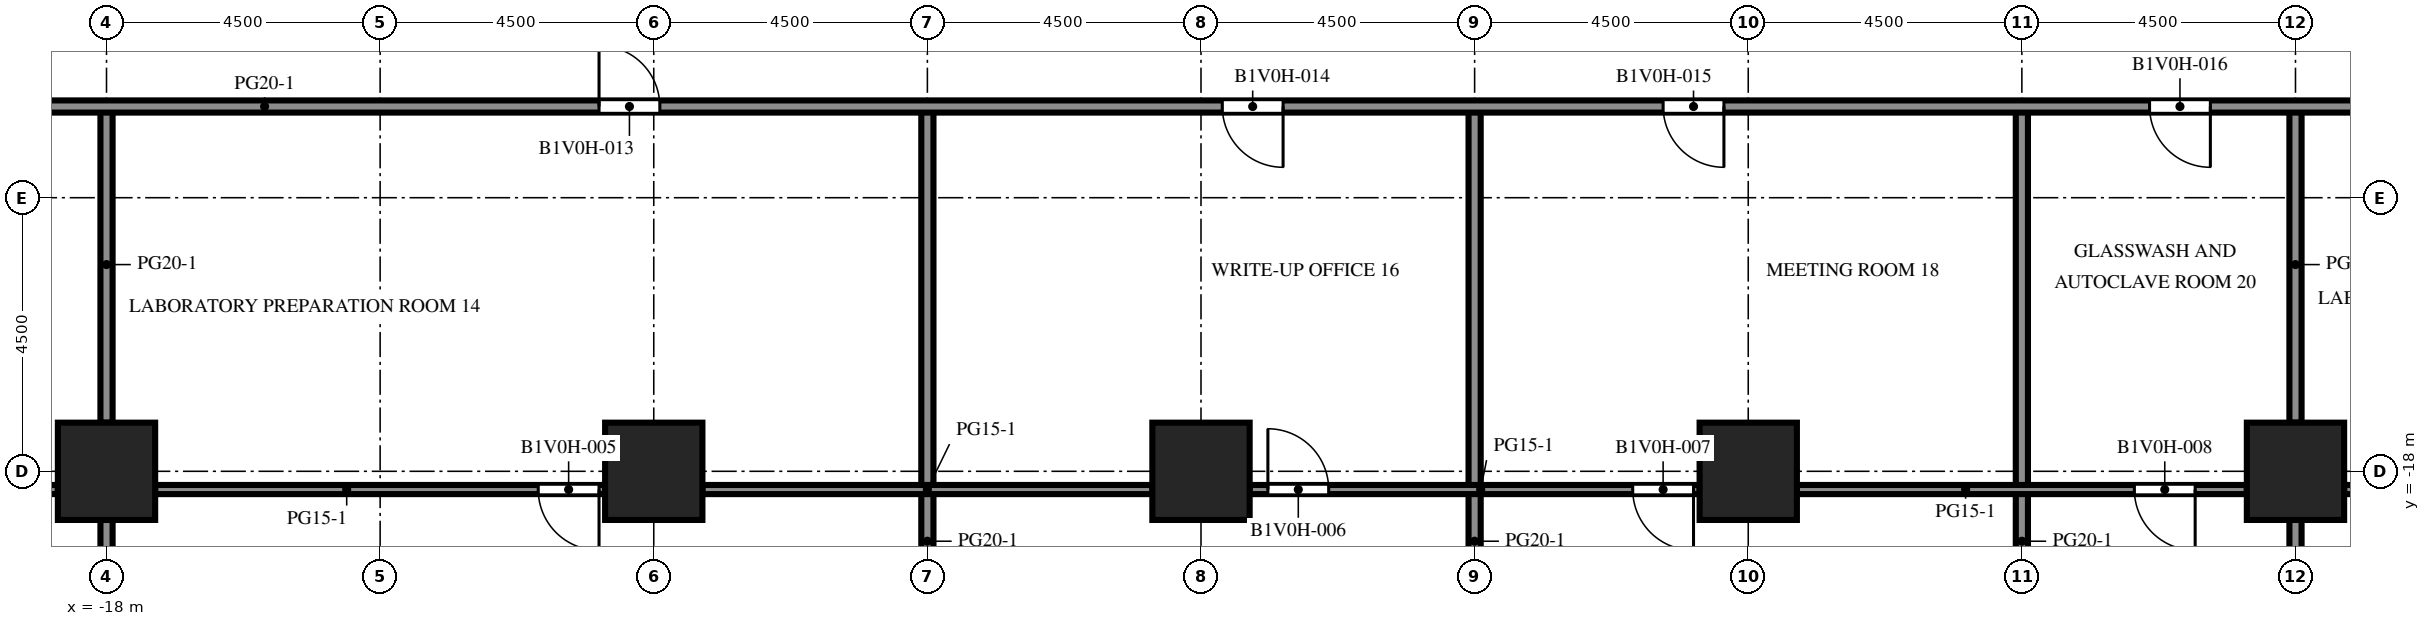
"""IFC4 building model, lengths in metres.
Left out: names, types, materials, properties, quantities, classifications, styles, units other than length and angle.
Written with IfcOpenShell. Run it as: python <this file> out.ifc"""

import sys

from ifc_helpers import new_model, si_unit, direction, frame, frame_2d, origin, origin_2d, place, context, subcontext, project, spatial, rectangle, extrude, element, fill, save


model = new_model("IFC4")
c1 = context("Model", 3, precision=1e-05, world=origin(), true_north=direction((0.0, 1.0)))
c2 = subcontext(c1, "Body", "Model", "MODEL_VIEW")
j1 = project(units=[si_unit("LENGTHUNIT", "METRE"), si_unit("PLANEANGLEUNIT", "RADIAN")], contexts=[c1])
p1 = place(None, origin())
s1 = spatial("IfcSite", under=j1, at=p1, CompositionType="ELEMENT")
p2 = place(p1, origin())
s2 = spatial("IfcBuilding", under=s1, at=p2, CompositionType="ELEMENT")
p3 = place(p2, frame((0.0, 0.0, 7.2)))
s3 = spatial("IfcBuildingStorey", under=s2, at=p3, CompositionType="ELEMENT", Elevation=7.2)
for number, where, z_axis, x_axis in (
    (1, (-18.0, -18.0, 0.0), (0.0, 0.0, 1.0), (1.0, 0.0, 0.0)),
    (2, (-9.0, -18.0, 0.0), (0.0, 0.0, 1.0), (1.0, 0.0, 0.0)),
    (3, (0.0, -18.0, 0.0), (0.0, 0.0, 1.0), (1.0, 0.0, 0.0)),
    (4, (9.0, -18.0, 0.0), (0.0, 0.0, 1.0), (1.0, 0.0, 0.0)),
    (5, (18.0, -18.0, 0.0), (0.0, 0.0, 1.0), (1.0, 0.0, 0.0)),
):
    element("IfcColumn", number, at=place(p3, frame(where, z_axis=z_axis, x_axis=x_axis)), inside=s3, PredefinedType="COLUMN", context=c2, shape_type="SweptSolid", body=[
        extrude(rectangle(XDim=1.6, YDim=1.6, at=origin_2d()), origin(), (0.0, 0.0, 1.0), 4.1),
    ])
p4 = place(p3, frame((-18.0, -26.3, 0.0), z_axis=(0.0, 0.0, 1.0), x_axis=(0.0, 1.0, 0.0)))
e6 = element("IfcWall", 6, at=p4, inside=s3, PredefinedType="PARTITIONING", context=c2, shape_type="SweptSolid", body=[
    extrude(rectangle(XDim=7.5, YDim=0.2, at=frame_2d((3.75, 0.0))), origin(), (0.0, 0.0, 1.0), 3.65),
])
p5 = place(p3, frame((-18.0, -17.2, 0.0), z_axis=(0.0, 0.0, 1.0), x_axis=(0.0, 1.0, 0.0)))
e7 = element("IfcWall", 7, at=p5, inside=s3, PredefinedType="PARTITIONING", context=c2, shape_type="SweptSolid", body=[
    extrude(rectangle(XDim=5.2, YDim=0.2, at=frame_2d((2.6, 0.0))), origin(), (0.0, 0.0, 1.0), 3.65),
])
for number, where, z_axis, x_axis in (
    (8, (-4.5, -26.3, 0.0), (0.0, 0.0, 1.0), (0.0, 1.0, 0.0)),
    (9, (4.5, -26.3, 0.0), (0.0, 0.0, 1.0), (0.0, 1.0, 0.0)),
    (10, (13.5, -26.3, 0.0), (0.0, 0.0, 1.0), (0.0, 1.0, 0.0)),
):
    element("IfcWall", number, at=place(p3, frame(where, z_axis=z_axis, x_axis=x_axis)), inside=s3, PredefinedType="PARTITIONING", context=c2, shape_type="SweptSolid", body=[
        extrude(rectangle(XDim=14.3, YDim=0.2, at=frame_2d((7.15, 0.0))), origin(), (0.0, 0.0, 1.0), 3.65),
    ])
p6 = place(p3, frame((18.0, -26.3, 0.0), z_axis=(0.0, 0.0, 1.0), x_axis=(0.0, 1.0, 0.0)))
e11 = element("IfcWall", 11, at=p6, inside=s3, PredefinedType="PARTITIONING", context=c2, shape_type="SweptSolid", body=[
    extrude(rectangle(XDim=7.5, YDim=0.2, at=frame_2d((3.75, 0.0))), origin(), (0.0, 0.0, 1.0), 3.65),
])
p7 = place(p3, frame((18.0, -17.2, 0.0), z_axis=(0.0, 0.0, 1.0), x_axis=(0.0, 1.0, 0.0)))
e12 = element("IfcWall", 12, at=p7, inside=s3, PredefinedType="PARTITIONING", context=c2, shape_type="SweptSolid", body=[
    extrude(rectangle(XDim=5.2, YDim=0.2, at=frame_2d((2.6, 0.0))), origin(), (0.0, 0.0, 1.0), 3.65),
])
p8 = place(p3, frame((-18.8, -18.3, 0.0), z_axis=(0.0, 0.0, 1.0), x_axis=(-1.0, 0.0, 0.0)))
e13 = element("IfcWall", 13, at=p8, inside=s3, PredefinedType="PARTITIONING", context=c2, shape_type="SweptSolid", body=[
    extrude(rectangle(XDim=7.5, YDim=0.15, at=frame_2d((3.75, 0.0))), origin(), (0.0, 0.0, 1.0), 3.65),
])
p9 = place(p8, frame((3.6, 0.0, 0.0)))
e14 = element("IfcOpeningElement", 14, at=p9, cuts=e13, PredefinedType="OPENING", context=c2, shape_type="SweptSolid", body=[
    extrude(rectangle(XDim=1.0, YDim=2.1, at=frame_2d((0.5, 1.05))), frame((0.0, 0.085, 0.0), z_axis=(0.0, -1.0, 0.0), x_axis=(1.0, 0.0, 0.0)), (0.0, 0.0, 1.0), 0.17),
])
p10 = place(p3, frame((-9.8, -18.3, 0.0), z_axis=(0.0, 0.0, 1.0), x_axis=(-1.0, 0.0, 0.0)))
e15 = element("IfcWall", 15, at=p10, inside=s3, PredefinedType="PARTITIONING", context=c2, shape_type="SweptSolid", body=[
    extrude(rectangle(XDim=7.4, YDim=0.15, at=frame_2d((3.7, 0.0))), origin(), (0.0, 0.0, 1.0), 3.65),
])
p11 = place(p10, frame((0.1, 0.0, 0.0)))
e16 = element("IfcOpeningElement", 16, at=p11, cuts=e15, PredefinedType="OPENING", context=c2, shape_type="SweptSolid", body=[
    extrude(rectangle(XDim=1.0, YDim=2.1, at=frame_2d((0.5, 1.05))), frame((0.0, 0.085, 0.0), z_axis=(0.0, -1.0, 0.0), x_axis=(1.0, 0.0, 0.0)), (0.0, 0.0, 1.0), 0.17),
])
p12 = place(p3, frame((-8.2, -18.3, 0.0), z_axis=(0.0, 0.0, 1.0), x_axis=(1.0, 0.0, 0.0)))
e17 = element("IfcWall", 17, at=p12, inside=s3, PredefinedType="PARTITIONING", context=c2, shape_type="SweptSolid", body=[
    extrude(rectangle(XDim=7.4, YDim=0.15, at=frame_2d((3.7, 0.0))), origin(), (0.0, 0.0, 1.0), 3.65),
])
p13 = place(p3, frame((8.2, -18.3, 0.0), z_axis=(0.0, 0.0, 1.0), x_axis=(-1.0, 0.0, 0.0)))
e18 = element("IfcWall", 18, at=p13, inside=s3, PredefinedType="PARTITIONING", context=c2, shape_type="SweptSolid", body=[
    extrude(rectangle(XDim=7.4, YDim=0.15, at=frame_2d((3.7, 0.0))), origin(), (0.0, 0.0, 1.0), 3.65),
])
p14 = place(p13, frame((6.1, 0.0, 0.0)))
e19 = element("IfcOpeningElement", 19, at=p14, cuts=e18, PredefinedType="OPENING", context=c2, shape_type="SweptSolid", body=[
    extrude(rectangle(XDim=1.0, YDim=2.1, at=frame_2d((0.5, 1.05))), frame((0.0, 0.085, 0.0), z_axis=(0.0, -1.0, 0.0), x_axis=(1.0, 0.0, 0.0)), (0.0, 0.0, 1.0), 0.17),
])
p15 = place(p13, frame((0.1, 0.0, 0.0)))
e20 = element("IfcOpeningElement", 20, at=p15, cuts=e18, PredefinedType="OPENING", context=c2, shape_type="SweptSolid", body=[
    extrude(rectangle(XDim=1.0, YDim=2.1, at=frame_2d((0.5, 1.05))), frame((0.0, 0.085, 0.0), z_axis=(0.0, -1.0, 0.0), x_axis=(1.0, 0.0, 0.0)), (0.0, 0.0, 1.0), 0.17),
])
p16 = place(p3, frame((17.2, -18.3, 0.0), z_axis=(0.0, 0.0, 1.0), x_axis=(-1.0, 0.0, 0.0)))
e21 = element("IfcWall", 21, at=p16, inside=s3, PredefinedType="PARTITIONING", context=c2, shape_type="SweptSolid", body=[
    extrude(rectangle(XDim=7.4, YDim=0.15, at=frame_2d((3.7, 0.0))), origin(), (0.0, 0.0, 1.0), 3.65),
])
p17 = place(p16, frame((0.85, 0.0, 0.0)))
e22 = element("IfcOpeningElement", 22, at=p17, cuts=e21, PredefinedType="OPENING", context=c2, shape_type="SweptSolid", body=[
    extrude(rectangle(XDim=1.0, YDim=2.1, at=frame_2d((0.5, 1.05))), frame((0.0, 0.085, 0.0), z_axis=(0.0, -1.0, 0.0), x_axis=(1.0, 0.0, 0.0)), (0.0, 0.0, 1.0), 0.17),
])
p18 = place(p3, frame((21.7, -18.3, 0.0), z_axis=(0.0, 0.0, 1.0), x_axis=(-1.0, 0.0, 0.0)))
e23 = element("IfcWall", 23, at=p18, inside=s3, PredefinedType="PARTITIONING", context=c2, shape_type="SweptSolid", body=[
    extrude(rectangle(XDim=2.9, YDim=0.15, at=frame_2d((1.45, 0.0))), origin(), (0.0, 0.0, 1.0), 3.65),
])
p19 = place(p18, frame((0.1, 0.0, 0.0)))
e24 = element("IfcOpeningElement", 24, at=p19, cuts=e23, PredefinedType="OPENING", context=c2, shape_type="SweptSolid", body=[
    extrude(rectangle(XDim=1.0, YDim=2.1, at=frame_2d((0.5, 1.05))), frame((0.0, 0.085, 0.0), z_axis=(0.0, -1.0, 0.0), x_axis=(1.0, 0.0, 0.0)), (0.0, 0.0, 1.0), 0.17),
])
p20 = place(p3, frame((26.85, -12.0, 0.0), z_axis=(0.0, 0.0, 1.0), x_axis=(-1.0, 0.0, 0.0)))
e25 = element("IfcWall", 25, at=p20, inside=s3, PredefinedType="PARTITIONING", context=c2, shape_type="SweptSolid", body=[
    extrude(rectangle(XDim=53.7, YDim=0.2, at=frame_2d((26.85, 0.0))), origin(), (0.0, 0.0, 1.0), 3.65),
])
p21 = place(p20, frame((47.75, 0.0, 0.0)))
e26 = element("IfcOpeningElement", 26, at=p21, cuts=e25, PredefinedType="OPENING", context=c2, shape_type="SweptSolid", body=[
    extrude(rectangle(XDim=1.0, YDim=2.1, at=frame_2d((0.5, 1.05))), frame((0.0, 0.11, 0.0), z_axis=(0.0, -1.0, 0.0), x_axis=(1.0, 0.0, 0.0)), (0.0, 0.0, 1.0), 0.22),
])
p22 = place(p20, frame((35.75, 0.0, 0.0)))
e27 = element("IfcOpeningElement", 27, at=p22, cuts=e25, PredefinedType="OPENING", context=c2, shape_type="SweptSolid", body=[
    extrude(rectangle(XDim=1.0, YDim=2.1, at=frame_2d((0.5, 1.05))), frame((0.0, 0.11, 0.0), z_axis=(0.0, -1.0, 0.0), x_axis=(1.0, 0.0, 0.0)), (0.0, 0.0, 1.0), 0.22),
])
p23 = place(p20, frame((25.5, 0.0, 0.0)))
e28 = element("IfcOpeningElement", 28, at=p23, cuts=e25, PredefinedType="OPENING", context=c2, shape_type="SweptSolid", body=[
    extrude(rectangle(XDim=1.0, YDim=2.1, at=frame_2d((0.5, 1.05))), frame((0.0, 0.11, 0.0), z_axis=(0.0, -1.0, 0.0), x_axis=(1.0, 0.0, 0.0)), (0.0, 0.0, 1.0), 0.22),
])
p24 = place(p20, frame((18.25, 0.0, 0.0)))
e29 = element("IfcOpeningElement", 29, at=p24, cuts=e25, PredefinedType="OPENING", context=c2, shape_type="SweptSolid", body=[
    extrude(rectangle(XDim=1.0, YDim=2.1, at=frame_2d((0.5, 1.05))), frame((0.0, 0.11, 0.0), z_axis=(0.0, -1.0, 0.0), x_axis=(1.0, 0.0, 0.0)), (0.0, 0.0, 1.0), 0.22),
])
p25 = place(p20, frame((10.25, 0.0, 0.0)))
e30 = element("IfcOpeningElement", 30, at=p25, cuts=e25, PredefinedType="OPENING", context=c2, shape_type="SweptSolid", body=[
    extrude(rectangle(XDim=1.0, YDim=2.1, at=frame_2d((0.5, 1.05))), frame((0.0, 0.11, 0.0), z_axis=(0.0, -1.0, 0.0), x_axis=(1.0, 0.0, 0.0)), (0.0, 0.0, 1.0), 0.22),
])
p26 = place(p20, frame((3.0, 0.0, 0.0)))
e31 = element("IfcOpeningElement", 31, at=p26, cuts=e25, PredefinedType="OPENING", context=c2, shape_type="SweptSolid", body=[
    extrude(rectangle(XDim=1.0, YDim=2.1, at=frame_2d((0.5, 1.05))), frame((0.0, 0.11, 0.0), z_axis=(0.0, -1.0, 0.0), x_axis=(1.0, 0.0, 0.0)), (0.0, 0.0, 1.0), 0.22),
])
p27 = place(p11, origin())
e32 = element("IfcDoor", 32, at=p27, inside=s3, OperationType="SINGLE_SWING_LEFT", PredefinedType="DOOR", context=c2, shape_type="SweptSolid", body=[
    extrude(rectangle(XDim=1.0, YDim=2.1, at=frame_2d((0.5, 1.05))), frame((0.0, 0.025, 0.0), z_axis=(0.0, -1.0, 0.0), x_axis=(1.0, 0.0, 0.0)), (0.0, 0.0, 1.0), 0.05),
])
fill(e16, e32)
p28 = place(p14, origin())
e33 = element("IfcDoor", 33, at=p28, inside=s3, OperationType="SINGLE_SWING_RIGHT", PredefinedType="DOOR", context=c2, shape_type="SweptSolid", body=[
    extrude(rectangle(XDim=1.0, YDim=2.1, at=frame_2d((0.5, 1.05))), frame((0.0, 0.025, 0.0), z_axis=(0.0, -1.0, 0.0), x_axis=(1.0, 0.0, 0.0)), (0.0, 0.0, 1.0), 0.05),
])
fill(e19, e33)
p29 = place(p15, origin())
e34 = element("IfcDoor", 34, at=p29, inside=s3, OperationType="SINGLE_SWING_LEFT", PredefinedType="DOOR", context=c2, shape_type="SweptSolid", body=[
    extrude(rectangle(XDim=1.0, YDim=2.1, at=frame_2d((0.5, 1.05))), frame((0.0, 0.025, 0.0), z_axis=(0.0, -1.0, 0.0), x_axis=(1.0, 0.0, 0.0)), (0.0, 0.0, 1.0), 0.05),
])
fill(e20, e34)
p30 = place(p17, origin())
e35 = element("IfcDoor", 35, at=p30, inside=s3, OperationType="SINGLE_SWING_LEFT", PredefinedType="DOOR", context=c2, shape_type="SweptSolid", body=[
    extrude(rectangle(XDim=1.0, YDim=2.1, at=frame_2d((0.5, 1.05))), frame((0.0, 0.025, 0.0), z_axis=(0.0, -1.0, 0.0), x_axis=(1.0, 0.0, 0.0)), (0.0, 0.0, 1.0), 0.05),
])
fill(e22, e35)
p31 = place(p22, origin())
e36 = element("IfcDoor", 36, at=p31, inside=s3, OperationType="SINGLE_SWING_RIGHT", PredefinedType="DOOR", context=c2, shape_type="SweptSolid", body=[
    extrude(rectangle(XDim=1.0, YDim=2.1, at=frame_2d((0.5, 1.05))), frame((0.0, 0.025, 0.0), z_axis=(0.0, -1.0, 0.0), x_axis=(1.0, 0.0, 0.0)), (0.0, 0.0, 1.0), 0.05),
])
fill(e27, e36)
p32 = place(p23, origin())
e37 = element("IfcDoor", 37, at=p32, inside=s3, OperationType="SINGLE_SWING_LEFT", PredefinedType="DOOR", context=c2, shape_type="SweptSolid", body=[
    extrude(rectangle(XDim=1.0, YDim=2.1, at=frame_2d((0.5, 1.05))), frame((0.0, 0.025, 0.0), z_axis=(0.0, -1.0, 0.0), x_axis=(1.0, 0.0, 0.0)), (0.0, 0.0, 1.0), 0.05),
])
fill(e28, e37)
p33 = place(p24, origin())
e38 = element("IfcDoor", 38, at=p33, inside=s3, OperationType="SINGLE_SWING_LEFT", PredefinedType="DOOR", context=c2, shape_type="SweptSolid", body=[
    extrude(rectangle(XDim=1.0, YDim=2.1, at=frame_2d((0.5, 1.05))), frame((0.0, 0.025, 0.0), z_axis=(0.0, -1.0, 0.0), x_axis=(1.0, 0.0, 0.0)), (0.0, 0.0, 1.0), 0.05),
])
fill(e29, e38)
p34 = place(p25, origin())
e39 = element("IfcDoor", 39, at=p34, inside=s3, OperationType="SINGLE_SWING_LEFT", PredefinedType="DOOR", context=c2, shape_type="SweptSolid", body=[
    extrude(rectangle(XDim=1.0, YDim=2.1, at=frame_2d((0.5, 1.05))), frame((0.0, 0.025, 0.0), z_axis=(0.0, -1.0, 0.0), x_axis=(1.0, 0.0, 0.0)), (0.0, 0.0, 1.0), 0.05),
])
fill(e30, e39)
save(model, sys.argv[1])
